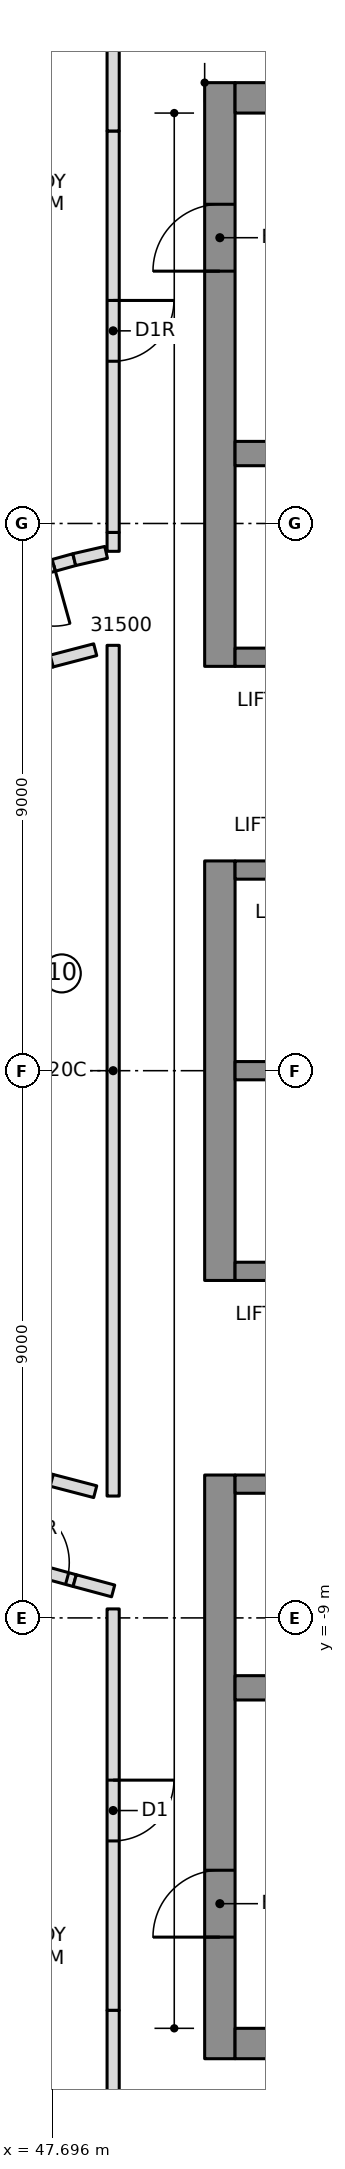
"""IFC4 building model, lengths in metres.
Left out: names, types, materials, properties, quantities, classifications, styles, units other than length and angle.
Written with IfcOpenShell. Run it as: python <this file> out.ifc"""

import sys

from ifc_helpers import new_model, si_unit, direction, frame, frame_2d, origin, place, context, subcontext, project, spatial, rectangle, extrude, element, fill, save


model = new_model("IFC4")
c1 = context("Model", 3, precision=1e-05, world=origin(), true_north=direction((0.0, 1.0)))
c2 = subcontext(c1, "Body", "Model", "MODEL_VIEW")
j1 = project(units=[si_unit("LENGTHUNIT", "METRE"), si_unit("PLANEANGLEUNIT", "RADIAN")], contexts=[c1])
p1 = place(None, origin())
s1 = spatial("IfcSite", under=j1, at=p1, CompositionType="ELEMENT")
p2 = place(p1, origin())
s2 = spatial("IfcBuilding", under=s1, at=p2, CompositionType="ELEMENT")
p3 = place(p2, frame((0.0, 0.0, 267.9)))
s3 = spatial("IfcBuildingStorey", under=s2, at=p3, CompositionType="ELEMENT", Elevation=267.9)
p4 = place(p3, frame((50.45, 6.65, 0.0), z_axis=(0.0, 0.0, 1.0), x_axis=(0.0, 1.0, 0.0)))
e1 = element("IfcWall", 1, at=p4, inside=s3, PredefinedType="SHEAR", context=c2, shape_type="SweptSolid", body=[
    extrude(rectangle(XDim=9.6, YDim=0.5, at=frame_2d((4.8, 0.0))), origin(), (0.0, 0.0, 1.0), 3.55),
])
p5 = place(p4, frame((6.5, 0.0, 0.0)))
e2 = element("IfcOpeningElement", 2, at=p5, cuts=e1, PredefinedType="OPENING", context=c2, shape_type="SweptSolid", body=[
    extrude(rectangle(XDim=1.1, YDim=2.1, at=frame_2d((0.55, 1.05))), frame((0.0, 0.26, 0.0), z_axis=(0.0, -1.0, 0.0), x_axis=(1.0, 0.0, 0.0)), (0.0, 0.0, 1.0), 0.52),
])
p6 = place(p3, frame((50.45, -3.45, 0.0), z_axis=(0.0, 0.0, 1.0), x_axis=(0.0, 1.0, 0.0)))
e3 = element("IfcWall", 3, at=p6, inside=s3, PredefinedType="SHEAR", context=c2, shape_type="SweptSolid", body=[
    extrude(rectangle(XDim=6.9, YDim=0.5, at=frame_2d((3.45, 0.0))), origin(), (0.0, 0.0, 1.0), 3.55),
])
p7 = place(p3, frame((50.45, -16.25, 0.0), z_axis=(0.0, 0.0, 1.0), x_axis=(0.0, 1.0, 0.0)))
e4 = element("IfcWall", 4, at=p7, inside=s3, PredefinedType="SHEAR", context=c2, shape_type="SweptSolid", body=[
    extrude(rectangle(XDim=9.6, YDim=0.5, at=frame_2d((4.8, 0.0))), origin(), (0.0, 0.0, 1.0), 3.55),
])
p8 = place(p7, frame((2.0, 0.0, 0.0)))
e5 = element("IfcOpeningElement", 5, at=p8, cuts=e4, PredefinedType="OPENING", context=c2, shape_type="SweptSolid", body=[
    extrude(rectangle(XDim=1.1, YDim=2.1, at=frame_2d((0.55, 1.05))), frame((0.0, 0.26, 0.0), z_axis=(0.0, -1.0, 0.0), x_axis=(1.0, 0.0, 0.0)), (0.0, 0.0, 1.0), 0.52),
])
for number, where, z_axis, x_axis in (
    (6, (50.7, 16.0, 0.0), (0.0, 0.0, 1.0), (1.0, 0.0, 0.0)),
    (7, (50.7, -16.0, 0.0), (0.0, 0.0, 1.0), (1.0, 0.0, 0.0)),
):
    element("IfcWall", number, at=place(p3, frame(where, z_axis=z_axis, x_axis=x_axis)), inside=s3, PredefinedType="SHEAR", context=c2, shape_type="SweptSolid", body=[
        extrude(rectangle(XDim=13.52, YDim=0.5, at=frame_2d((6.76, 0.0))), origin(), (0.0, 0.0, 1.0), 3.55),
    ])
p9 = place(p3, frame((50.7, 10.15, 0.0), z_axis=(0.0, 0.0, 1.0), x_axis=(1.0, 0.0, 0.0)))
e8 = element("IfcWall", 8, at=p9, inside=s3, PredefinedType="SHEAR", context=c2, shape_type="SweptSolid", body=[
    extrude(rectangle(XDim=13.02, YDim=0.4, at=frame_2d((6.51, 0.0))), origin(), (0.0, 0.0, 1.0), 3.55),
])
p10 = place(p9, frame((0.7, 0.0, 0.0)))
e9 = element("IfcOpeningElement", 9, at=p10, cuts=e8, PredefinedType="OPENING", context=c2, shape_type="SweptSolid", body=[
    extrude(rectangle(XDim=1.1, YDim=2.1, at=frame_2d((0.55, 1.05))), frame((0.0, 0.21, 0.0), z_axis=(0.0, -1.0, 0.0), x_axis=(1.0, 0.0, 0.0)), (0.0, 0.0, 1.0), 0.42),
])
p11 = place(p9, frame((3.5, 0.0, 0.0)))
e10 = element("IfcOpeningElement", 10, at=p11, cuts=e8, PredefinedType="OPENING", context=c2, shape_type="SweptSolid", body=[
    extrude(rectangle(XDim=1.1, YDim=2.1, at=frame_2d((0.55, 1.05))), frame((0.0, 0.21, 0.0), z_axis=(0.0, -1.0, 0.0), x_axis=(1.0, 0.0, 0.0)), (0.0, 0.0, 1.0), 0.42),
])
p12 = place(p3, frame((50.7, -10.15, 0.0), z_axis=(0.0, 0.0, 1.0), x_axis=(1.0, 0.0, 0.0)))
e11 = element("IfcWall", 11, at=p12, inside=s3, PredefinedType="SHEAR", context=c2, shape_type="SweptSolid", body=[
    extrude(rectangle(XDim=13.02, YDim=0.4, at=frame_2d((6.51, 0.0))), origin(), (0.0, 0.0, 1.0), 3.55),
])
p13 = place(p3, frame((50.7, 0.0, 0.0), z_axis=(0.0, 0.0, 1.0), x_axis=(1.0, 0.0, 0.0)))
e12 = element("IfcWall", 12, at=p13, inside=s3, PredefinedType="SHEAR", context=c2, shape_type="SweptSolid", body=[
    extrude(rectangle(XDim=10.9, YDim=0.3, at=frame_2d((5.45, 0.0))), origin(), (0.0, 0.0, 1.0), 3.55),
])
p14 = place(p3, frame((50.7, 3.3, 0.0), z_axis=(0.0, 0.0, 1.0), x_axis=(1.0, 0.0, 0.0)))
e13 = element("IfcWall", 13, at=p14, inside=s3, PredefinedType="SHEAR", context=c2, shape_type="SweptSolid", body=[
    extrude(rectangle(XDim=10.9, YDim=0.3, at=frame_2d((5.45, 0.0))), origin(), (0.0, 0.0, 1.0), 3.55),
])
p15 = place(p14, frame((0.7, 0.0, 0.0)))
e14 = element("IfcOpeningElement", 14, at=p15, cuts=e13, PredefinedType="OPENING", context=c2, shape_type="SweptSolid", body=[
    extrude(rectangle(XDim=1.1, YDim=2.1, at=frame_2d((0.55, 1.05))), frame((0.0, 0.16, 0.0), z_axis=(0.0, -1.0, 0.0), x_axis=(1.0, 0.0, 0.0)), (0.0, 0.0, 1.0), 0.32),
])
p16 = place(p14, frame((3.5, 0.0, 0.0)))
e15 = element("IfcOpeningElement", 15, at=p16, cuts=e13, PredefinedType="OPENING", context=c2, shape_type="SweptSolid", body=[
    extrude(rectangle(XDim=1.1, YDim=2.1, at=frame_2d((0.55, 1.05))), frame((0.0, 0.16, 0.0), z_axis=(0.0, -1.0, 0.0), x_axis=(1.0, 0.0, 0.0)), (0.0, 0.0, 1.0), 0.32),
])
p17 = place(p14, frame((6.4, 0.0, 0.0)))
e16 = element("IfcOpeningElement", 16, at=p17, cuts=e13, PredefinedType="OPENING", context=c2, shape_type="SweptSolid", body=[
    extrude(rectangle(XDim=0.9, YDim=2.1, at=frame_2d((0.45, 1.05))), frame((0.0, 0.16, 0.0), z_axis=(0.0, -1.0, 0.0), x_axis=(1.0, 0.0, 0.0)), (0.0, 0.0, 1.0), 0.32),
])
p18 = place(p14, frame((9.2, 0.0, 0.0)))
e17 = element("IfcOpeningElement", 17, at=p18, cuts=e13, PredefinedType="OPENING", context=c2, shape_type="SweptSolid", body=[
    extrude(rectangle(XDim=0.9, YDim=2.1, at=frame_2d((0.45, 1.05))), frame((0.0, 0.16, 0.0), z_axis=(0.0, -1.0, 0.0), x_axis=(1.0, 0.0, 0.0)), (0.0, 0.0, 1.0), 0.32),
])
p19 = place(p3, frame((50.7, 6.8, 0.0), z_axis=(0.0, 0.0, 1.0), x_axis=(1.0, 0.0, 0.0)))
e18 = element("IfcWall", 18, at=p19, inside=s3, PredefinedType="SHEAR", context=c2, shape_type="SweptSolid", body=[
    extrude(rectangle(XDim=10.9, YDim=0.3, at=frame_2d((5.45, 0.0))), origin(), (0.0, 0.0, 1.0), 3.55),
])
p20 = place(p19, frame((6.4, 0.0, 0.0)))
e19 = element("IfcOpeningElement", 19, at=p20, cuts=e18, PredefinedType="OPENING", context=c2, shape_type="SweptSolid", body=[
    extrude(rectangle(XDim=0.9, YDim=2.1, at=frame_2d((0.45, 1.05))), frame((0.0, 0.16, 0.0), z_axis=(0.0, -1.0, 0.0), x_axis=(1.0, 0.0, 0.0)), (0.0, 0.0, 1.0), 0.32),
])
p21 = place(p19, frame((9.2, 0.0, 0.0)))
e20 = element("IfcOpeningElement", 20, at=p21, cuts=e18, PredefinedType="OPENING", context=c2, shape_type="SweptSolid", body=[
    extrude(rectangle(XDim=0.9, YDim=2.1, at=frame_2d((0.45, 1.05))), frame((0.0, 0.16, 0.0), z_axis=(0.0, -1.0, 0.0), x_axis=(1.0, 0.0, 0.0)), (0.0, 0.0, 1.0), 0.32),
])
p22 = place(p3, frame((50.7, -3.3, 0.0), z_axis=(0.0, 0.0, 1.0), x_axis=(1.0, 0.0, 0.0)))
e21 = element("IfcWall", 21, at=p22, inside=s3, PredefinedType="SHEAR", context=c2, shape_type="SweptSolid", body=[
    extrude(rectangle(XDim=10.9, YDim=0.3, at=frame_2d((5.45, 0.0))), origin(), (0.0, 0.0, 1.0), 3.55),
])
p23 = place(p22, frame((9.1, 0.0, 0.0)))
e22 = element("IfcOpeningElement", 22, at=p23, cuts=e21, PredefinedType="OPENING", context=c2, shape_type="SweptSolid", body=[
    extrude(rectangle(XDim=1.1, YDim=2.1, at=frame_2d((0.55, 1.05))), frame((0.0, 0.16, 0.0), z_axis=(0.0, -1.0, 0.0), x_axis=(1.0, 0.0, 0.0)), (0.0, 0.0, 1.0), 0.32),
])
p24 = place(p3, frame((50.7, -6.8, 0.0), z_axis=(0.0, 0.0, 1.0), x_axis=(1.0, 0.0, 0.0)))
e23 = element("IfcWall", 23, at=p24, inside=s3, PredefinedType="SHEAR", context=c2, shape_type="SweptSolid", body=[
    extrude(rectangle(XDim=10.9, YDim=0.3, at=frame_2d((5.45, 0.0))), origin(), (0.0, 0.0, 1.0), 3.55),
])
p25 = place(p24, frame((6.3, 0.0, 0.0)))
e24 = element("IfcOpeningElement", 24, at=p25, cuts=e23, PredefinedType="OPENING", context=c2, shape_type="SweptSolid", body=[
    extrude(rectangle(XDim=1.1, YDim=2.1, at=frame_2d((0.55, 1.05))), frame((0.0, 0.16, 0.0), z_axis=(0.0, -1.0, 0.0), x_axis=(1.0, 0.0, 0.0)), (0.0, 0.0, 1.0), 0.32),
])
p26 = place(p24, frame((9.1, 0.0, 0.0)))
e25 = element("IfcOpeningElement", 25, at=p26, cuts=e23, PredefinedType="OPENING", context=c2, shape_type="SweptSolid", body=[
    extrude(rectangle(XDim=1.1, YDim=2.1, at=frame_2d((0.55, 1.05))), frame((0.0, 0.16, 0.0), z_axis=(0.0, -1.0, 0.0), x_axis=(1.0, 0.0, 0.0)), (0.0, 0.0, 1.0), 0.32),
])
p27 = place(p24, frame((0.8, 0.0, 0.0)))
e26 = element("IfcOpeningElement", 26, at=p27, cuts=e23, PredefinedType="OPENING", context=c2, shape_type="SweptSolid", body=[
    extrude(rectangle(XDim=0.9, YDim=2.1, at=frame_2d((0.45, 1.05))), frame((0.0, 0.16, 0.0), z_axis=(0.0, -1.0, 0.0), x_axis=(1.0, 0.0, 0.0)), (0.0, 0.0, 1.0), 0.32),
])
p28 = place(p24, frame((3.6, 0.0, 0.0)))
e27 = element("IfcOpeningElement", 27, at=p28, cuts=e23, PredefinedType="OPENING", context=c2, shape_type="SweptSolid", body=[
    extrude(rectangle(XDim=0.9, YDim=2.1, at=frame_2d((0.45, 1.05))), frame((0.0, 0.16, 0.0), z_axis=(0.0, -1.0, 0.0), x_axis=(1.0, 0.0, 0.0)), (0.0, 0.0, 1.0), 0.32),
])
p29 = place(p3, frame((48.056, 8.405, 0.0), z_axis=(0.0, 0.0, 1.0), x_axis=(-0.963429942227, -0.267960344866, 0.0)))
e28 = element("IfcWall", 28, at=p29, inside=s3, PredefinedType="PARTITIONING", context=c2, shape_type="SweptSolid", body=[
    extrude(rectangle(XDim=4.177, YDim=0.2, at=frame_2d((2.089, 0.0))), origin(), (0.0, 0.0, 1.0), 3.25),
])
p30 = place(p29, frame((0.35, 0.0, 0.0)))
e29 = element("IfcOpeningElement", 29, at=p30, cuts=e28, PredefinedType="OPENING", context=c2, shape_type="SweptSolid", body=[
    extrude(rectangle(XDim=1.0, YDim=2.1, at=frame_2d((0.5, 1.05))), frame((0.0, 0.11, 0.0), z_axis=(0.0, -1.0, 0.0), x_axis=(1.0, 0.0, 0.0)), (0.0, 0.0, 1.0), 0.22),
])
p31 = place(p3, frame((44.031, -7.286, 0.0), z_axis=(0.0, 0.0, 1.0), x_axis=(0.964708521199, -0.263320088726, 0.0)))
e30 = element("IfcWall", 30, at=p31, inside=s3, PredefinedType="PARTITIONING", context=c2, shape_type="SweptSolid", body=[
    extrude(rectangle(XDim=4.179, YDim=0.2, at=frame_2d((2.089, 0.0))), origin(), (0.0, 0.0, 1.0), 3.25),
])
p32 = place(p31, frame((3.05, 0.0, 0.0)))
e31 = element("IfcOpeningElement", 31, at=p32, cuts=e30, PredefinedType="OPENING", context=c2, shape_type="SweptSolid", body=[
    extrude(rectangle(XDim=1.0, YDim=2.1, at=frame_2d((0.5, 1.05))), frame((0.0, 0.11, 0.0), z_axis=(0.0, -1.0, 0.0), x_axis=(1.0, 0.0, 0.0)), (0.0, 0.0, 1.0), 0.22),
])
p33 = place(p3, frame((43.918, 5.675, 0.0), z_axis=(0.0, 0.0, 1.0), x_axis=(0.962411212211, 0.271596499628, 0.0)))
e32 = element("IfcWall", 32, at=p33, inside=s3, PredefinedType="PARTITIONING", context=c2, shape_type="SweptSolid", body=[
    extrude(rectangle(XDim=3.913, YDim=0.2, at=frame_2d((1.957, 0.0))), origin(), (0.0, 0.0, 1.0), 3.25),
])
p34 = place(p33, frame((1.457, 0.0, 0.0)))
e33 = element("IfcOpeningElement", 33, at=p34, cuts=e32, PredefinedType="OPENING", context=c2, shape_type="SweptSolid", body=[
    extrude(rectangle(XDim=1.0, YDim=2.1, at=frame_2d((0.5, 1.05))), frame((0.0, 0.11, 0.0), z_axis=(0.0, -1.0, 0.0), x_axis=(1.0, 0.0, 0.0)), (0.0, 0.0, 1.0), 0.22),
])
p35 = place(p3, frame((47.684, -6.738, 0.0), z_axis=(0.0, 0.0, 1.0), x_axis=(-0.962411212211, 0.271596499628, 0.0)))
e34 = element("IfcWall", 34, at=p35, inside=s3, PredefinedType="PARTITIONING", context=c2, shape_type="SweptSolid", body=[
    extrude(rectangle(XDim=3.913, YDim=0.2, at=frame_2d((1.957, 0.0))), origin(), (0.0, 0.0, 1.0), 3.25),
])
for number, where, z_axis, x_axis in (
    (35, (47.684, 6.738, 0.0), (0.0, 0.0, 1.0), (0.968, 0.253, 0.0)),
    (36, (48.4, -6.924, 0.0), (0.0, 0.0, 1.0), (-0.968, 0.253, 0.0)),
):
    element("IfcWall", number, at=place(p3, frame(where, z_axis=z_axis, x_axis=x_axis)), inside=s3, PredefinedType="PARTITIONING", context=c2, shape_type="SweptSolid", body=[
        extrude(rectangle(XDim=0.74, YDim=0.2, at=frame_2d((0.37, 0.0))), origin(), (0.0, 0.0, 1.0), 3.25),
    ])
p36 = place(p3, frame((48.695, 15.455, 0.0), z_axis=(0.0, 0.0, 1.0), x_axis=(0.0, -1.0, 0.0)))
e37 = element("IfcWall", 37, at=p36, inside=s3, PredefinedType="PARTITIONING", context=c2, shape_type="SweptSolid", body=[
    extrude(rectangle(XDim=6.603, YDim=0.2, at=frame_2d((3.302, 0.0))), origin(), (0.0, 0.0, 1.0), 3.25),
])
p37 = place(p36, frame((2.787, 0.0, 0.0)))
e38 = element("IfcOpeningElement", 38, at=p37, cuts=e37, PredefinedType="OPENING", context=c2, shape_type="SweptSolid", body=[
    extrude(rectangle(XDim=1.0, YDim=2.1, at=frame_2d((0.5, 1.05))), frame((0.0, 0.11, 0.0), z_axis=(0.0, -1.0, 0.0), x_axis=(1.0, 0.0, 0.0)), (0.0, 0.0, 1.0), 0.22),
])
p38 = place(p3, frame((48.695, -8.852, 0.0), z_axis=(0.0, 0.0, 1.0), x_axis=(0.0, -1.0, 0.0)))
e39 = element("IfcWall", 39, at=p38, inside=s3, PredefinedType="PARTITIONING", context=c2, shape_type="SweptSolid", body=[
    extrude(rectangle(XDim=6.603, YDim=0.2, at=frame_2d((3.302, 0.0))), origin(), (0.0, 0.0, 1.0), 3.25),
])
p39 = place(p38, frame((2.816, 0.0, 0.0)))
e40 = element("IfcOpeningElement", 40, at=p39, cuts=e39, PredefinedType="OPENING", context=c2, shape_type="SweptSolid", body=[
    extrude(rectangle(XDim=1.0, YDim=2.1, at=frame_2d((0.5, 1.05))), frame((0.0, 0.11, 0.0), z_axis=(0.0, -1.0, 0.0), x_axis=(1.0, 0.0, 0.0)), (0.0, 0.0, 1.0), 0.22),
])
p40 = place(p3, frame((48.695, 6.996, 0.0), z_axis=(0.0, 0.0, 1.0), x_axis=(0.0, -1.0, 0.0)))
e41 = element("IfcWall", 41, at=p40, inside=s3, PredefinedType="PARTITIONING", context=c2, shape_type="SweptSolid", body=[
    extrude(rectangle(XDim=13.992, YDim=0.2, at=frame_2d((6.996, 0.0))), origin(), (0.0, 0.0, 1.0), 3.25),
])
p41 = place(p3, frame((48.695, 18.553, 0.0), z_axis=(0.0, 0.0, 1.0), x_axis=(0.0, -1.0, 0.0)))
e42 = element("IfcWall", 42, at=p41, inside=s3, PredefinedType="PARTITIONING", context=c2, shape_type="SweptSolid", body=[
    extrude(rectangle(XDim=3.098, YDim=0.2, at=frame_2d((1.549, 0.0))), origin(), (0.0, 0.0, 1.0), 3.25),
])
p42 = place(p3, frame((48.695, 8.852, 0.0), z_axis=(0.0, 0.0, 1.0), x_axis=(0.0, -1.0, 0.0)))
e43 = element("IfcWall", 43, at=p42, inside=s3, PredefinedType="PARTITIONING", context=c2, shape_type="SweptSolid", body=[
    extrude(rectangle(XDim=0.31, YDim=0.2, at=frame_2d((0.155, 0.0))), origin(), (0.0, 0.0, 1.0), 3.25),
])
p43 = place(p3, frame((48.579, 8.525, 0.0), z_axis=(0.0, 0.0, 1.0), x_axis=(-0.974742633665, -0.223331140051, 0.0)))
e44 = element("IfcWall", 44, at=p43, inside=s3, PredefinedType="PARTITIONING", context=c2, shape_type="SweptSolid", body=[
    extrude(rectangle(XDim=0.537, YDim=0.2, at=frame_2d((0.269, 0.0))), origin(), (0.0, 0.0, 1.0), 3.25),
])
p44 = place(p3, frame((48.062, -8.386, 0.0), z_axis=(0.0, 0.0, 1.0), x_axis=(0.965669715173, -0.259772980114, 0.0)))
e45 = element("IfcWall", 45, at=p44, inside=s3, PredefinedType="PARTITIONING", context=c2, shape_type="SweptSolid", body=[
    extrude(rectangle(XDim=0.655, YDim=0.2, at=frame_2d((0.328, 0.0))), origin(), (0.0, 0.0, 1.0), 3.25),
])
p45 = place(p3, frame((48.695, -15.455, 0.0), z_axis=(0.0, 0.0, 1.0), x_axis=(0.0, -1.0, 0.0)))
e46 = element("IfcWall", 46, at=p45, inside=s3, PredefinedType="PARTITIONING", context=c2, shape_type="SweptSolid", body=[
    extrude(rectangle(XDim=3.098, YDim=0.2, at=frame_2d((1.549, 0.0))), origin(), (0.0, 0.0, 1.0), 3.25),
])
p46 = place(p30, origin())
e47 = element("IfcDoor", 47, at=p46, inside=s3, OperationType="SINGLE_SWING_RIGHT", PredefinedType="DOOR", context=c2, shape_type="SweptSolid", body=[
    extrude(rectangle(XDim=1.0, YDim=2.1, at=frame_2d((0.5, 1.05))), frame((0.0, 0.025, 0.0), z_axis=(0.0, -1.0, 0.0), x_axis=(1.0, 0.0, 0.0)), (0.0, 0.0, 1.0), 0.05),
])
fill(e29, e47)
p47 = place(p32, origin())
e48 = element("IfcDoor", 48, at=p47, inside=s3, OperationType="SINGLE_SWING_RIGHT", PredefinedType="DOOR", context=c2, shape_type="SweptSolid", body=[
    extrude(rectangle(XDim=1.0, YDim=2.1, at=frame_2d((0.5, 1.05))), frame((0.0, 0.025, 0.0), z_axis=(0.0, -1.0, 0.0), x_axis=(1.0, 0.0, 0.0)), (0.0, 0.0, 1.0), 0.05),
])
fill(e31, e48)
p48 = place(p37, origin())
e49 = element("IfcDoor", 49, at=p48, inside=s3, OperationType="SINGLE_SWING_RIGHT", PredefinedType="DOOR", context=c2, shape_type="SweptSolid", body=[
    extrude(rectangle(XDim=1.0, YDim=2.1, at=frame_2d((0.5, 1.05))), frame((0.0, 0.025, 0.0), z_axis=(0.0, -1.0, 0.0), x_axis=(1.0, 0.0, 0.0)), (0.0, 0.0, 1.0), 0.05),
])
fill(e38, e49)
p49 = place(p39, origin())
e50 = element("IfcDoor", 50, at=p49, inside=s3, OperationType="SINGLE_SWING_LEFT", PredefinedType="DOOR", context=c2, shape_type="SweptSolid", body=[
    extrude(rectangle(XDim=1.0, YDim=2.1, at=frame_2d((0.5, 1.05))), frame((0.0, 0.025, 0.0), z_axis=(0.0, -1.0, 0.0), x_axis=(1.0, 0.0, 0.0)), (0.0, 0.0, 1.0), 0.05),
])
fill(e40, e50)
p50 = place(p5, origin())
e51 = element("IfcDoor", 51, at=p50, inside=s3, OperationType="SINGLE_SWING_RIGHT", PredefinedType="DOOR", context=c2, shape_type="SweptSolid", body=[
    extrude(rectangle(XDim=1.1, YDim=2.1, at=frame_2d((0.55, 1.05))), frame((0.0, 0.025, 0.0), z_axis=(0.0, -1.0, 0.0), x_axis=(1.0, 0.0, 0.0)), (0.0, 0.0, 1.0), 0.05),
])
fill(e2, e51)
p51 = place(p8, origin())
e52 = element("IfcDoor", 52, at=p51, inside=s3, OperationType="SINGLE_SWING_RIGHT", PredefinedType="DOOR", context=c2, shape_type="SweptSolid", body=[
    extrude(rectangle(XDim=1.1, YDim=2.1, at=frame_2d((0.55, 1.05))), frame((0.0, 0.025, 0.0), z_axis=(0.0, -1.0, 0.0), x_axis=(1.0, 0.0, 0.0)), (0.0, 0.0, 1.0), 0.05),
])
fill(e5, e52)
save(model, sys.argv[1])
